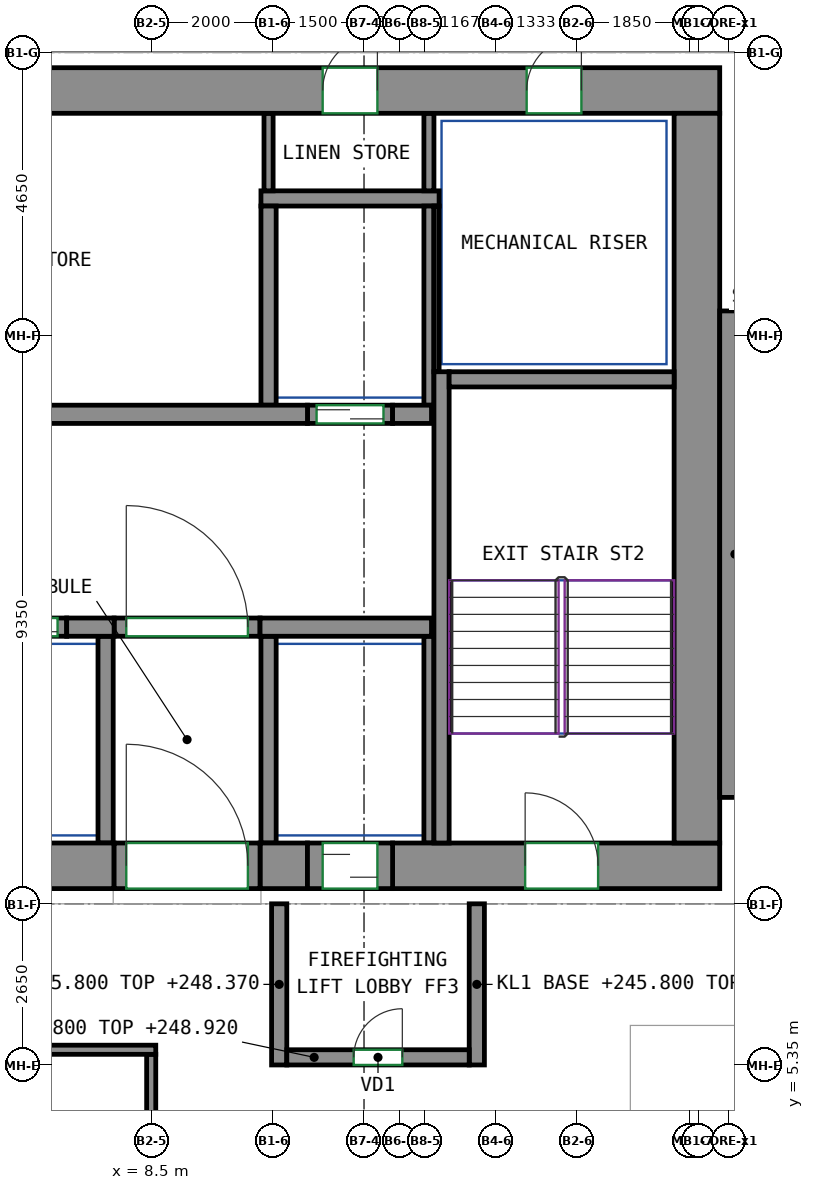
"""IFC4 building model, lengths in metres.
Left out: names, types, materials, properties, quantities, classifications, styles, units other than length and angle.
Written with IfcOpenShell. Run it as: python <this file> out.ifc"""

import sys

from ifc_helpers import new_model, si_unit, direction, frame, frame_2d, origin, place, context, subcontext, project, spatial, rectangle, extrude, source, transform, mapped, element, fill, save


model = new_model("IFC4")
c1 = context("Model", 3, precision=1e-05, world=origin(), true_north=direction((0.0, 1.0)))
c2 = subcontext(c1, "Body", "Model", "MODEL_VIEW")
j1 = project(units=[si_unit("LENGTHUNIT", "METRE"), si_unit("PLANEANGLEUNIT", "RADIAN")], contexts=[c1])
p1 = place(None, origin())
s1 = spatial("IfcSite", under=j1, at=p1, CompositionType="ELEMENT")
p2 = place(p1, origin())
s2 = spatial("IfcBuilding", under=s1, at=p2, CompositionType="ELEMENT")
p3 = place(p2, frame((0.0, 0.0, 245.8)))
s3 = spatial("IfcBuildingStorey", under=s2, at=p3, CompositionType="ELEMENT", Elevation=245.8)
m1 = source(origin(), c2, "Body", "SweptSolid", [
    extrude(rectangle(XDim=14.18, YDim=0.75, at=frame_2d((7.09, 0.0))), origin(), (0.0, 0.0, 1.0), 3.12),
])
p4 = place(p3, frame((-6.29, 8.625, 0.0), z_axis=(0.0, 0.0, 1.0), x_axis=(1.0, 0.0, 0.0)))
e1 = element("IfcWall", 1, at=p4, inside=s3, PredefinedType="SHEAR", context=c2, shape_type="MappedRepresentation", body=[
    mapped(m1, transform((0.0, 0.0, 0.0))),
])
m2 = source(origin(), c2, "Body", "SweptSolid", [
    extrude(rectangle(XDim=0.78, YDim=0.75, at=frame_2d((0.39, 0.0))), origin(), (0.0, 0.0, 1.0), 3.12),
])
p5 = place(p3, frame((10.29, 8.625, 0.0), z_axis=(0.0, 0.0, 1.0), x_axis=(1.0, 0.0, 0.0)))
e2 = element("IfcWall", 2, at=p5, inside=s3, PredefinedType="SHEAR", context=c2, shape_type="MappedRepresentation", body=[
    mapped(m2, transform((0.0, 0.0, 0.0))),
])
m3 = source(origin(), c2, "Body", "SweptSolid", [
    extrude(rectangle(XDim=5.38, YDim=0.75, at=frame_2d((2.69, 0.0))), origin(), (0.0, 0.0, 1.0), 3.12),
])
p6 = place(p3, frame((12.47, 8.625, 0.0), z_axis=(0.0, 0.0, 1.0), x_axis=(1.0, 0.0, 0.0)))
e3 = element("IfcWall", 3, at=p6, inside=s3, PredefinedType="SHEAR", context=c2, shape_type="MappedRepresentation", body=[
    mapped(m3, transform((0.0, 0.0, 0.0))),
])
p7 = place(p6, frame((2.18, 0.0, 0.0)))
e4 = element("IfcOpeningElement", 4, at=p7, cuts=e3, PredefinedType="OPENING", context=c2, shape_type="SweptSolid", body=[
    extrude(rectangle(XDim=1.2, YDim=2.1, at=frame_2d((0.6, 1.05))), frame((0.0, 0.385, 0.0), z_axis=(0.0, -1.0, 0.0), x_axis=(1.0, 0.0, 0.0)), (0.0, 0.0, 1.0), 0.77),
])
m4 = source(origin(), c2, "Body", "SweptSolid", [
    extrude(rectangle(XDim=33.6, YDim=0.75, at=frame_2d((16.8, 0.0))), origin(), (0.0, 0.0, 1.0), 3.12),
])
p8 = place(p3, frame((-15.75, 21.375, 0.0), z_axis=(0.0, 0.0, 1.0), x_axis=(1.0, 0.0, 0.0)))
e5 = element("IfcWall", 5, at=p8, inside=s3, PredefinedType="SHEAR", context=c2, shape_type="MappedRepresentation", body=[
    mapped(m4, transform((0.0, 0.0, 0.0))),
])
p9 = place(p8, frame((5.858, 0.0, 0.0)))
e6 = element("IfcOpeningElement", 6, at=p9, cuts=e5, PredefinedType="OPENING", context=c2, shape_type="SweptSolid", body=[
    extrude(rectangle(XDim=0.9, YDim=2.1, at=frame_2d((0.45, 1.05))), frame((0.0, 0.385, 0.0), z_axis=(0.0, -1.0, 0.0), x_axis=(1.0, 0.0, 0.0)), (0.0, 0.0, 1.0), 0.77),
])
p10 = place(p8, frame((10.923, 0.0, 0.0)))
e7 = element("IfcOpeningElement", 7, at=p10, cuts=e5, PredefinedType="OPENING", context=c2, shape_type="SweptSolid", body=[
    extrude(rectangle(XDim=0.9, YDim=2.1, at=frame_2d((0.45, 1.05))), frame((0.0, 0.385, 0.0), z_axis=(0.0, -1.0, 0.0), x_axis=(1.0, 0.0, 0.0)), (0.0, 0.0, 1.0), 0.77),
])
p11 = place(p8, frame((15.988, 0.0, 0.0)))
e8 = element("IfcOpeningElement", 8, at=p11, cuts=e5, PredefinedType="OPENING", context=c2, shape_type="SweptSolid", body=[
    extrude(rectangle(XDim=0.9, YDim=2.1, at=frame_2d((0.45, 1.05))), frame((0.0, 0.385, 0.0), z_axis=(0.0, -1.0, 0.0), x_axis=(1.0, 0.0, 0.0)), (0.0, 0.0, 1.0), 0.77),
])
p12 = place(p8, frame((21.643, 0.0, 0.0)))
e9 = element("IfcOpeningElement", 9, at=p12, cuts=e5, PredefinedType="OPENING", context=c2, shape_type="SweptSolid", body=[
    extrude(rectangle(XDim=0.9, YDim=2.1, at=frame_2d((0.45, 1.05))), frame((0.0, 0.385, 0.0), z_axis=(0.0, -1.0, 0.0), x_axis=(1.0, 0.0, 0.0)), (0.0, 0.0, 1.0), 0.77),
])
p13 = place(p8, frame((27.07, 0.0, 0.0)))
e10 = element("IfcOpeningElement", 10, at=p13, cuts=e5, PredefinedType="OPENING", context=c2, shape_type="SweptSolid", body=[
    extrude(rectangle(XDim=0.9, YDim=2.1, at=frame_2d((0.45, 1.05))), frame((0.0, 0.385, 0.0), z_axis=(0.0, -1.0, 0.0), x_axis=(1.0, 0.0, 0.0)), (0.0, 0.0, 1.0), 0.77),
])
p14 = place(p8, frame((2.275, 0.0, 0.0)))
e11 = element("IfcOpeningElement", 11, at=p14, cuts=e5, PredefinedType="OPENING", context=c2, shape_type="SweptSolid", body=[
    extrude(rectangle(XDim=0.9, YDim=2.1, at=frame_2d((0.45, 1.05))), frame((0.0, 0.385, 0.0), z_axis=(0.0, -1.0, 0.0), x_axis=(1.0, 0.0, 0.0)), (0.0, 0.0, 1.0), 0.77),
])
p15 = place(p8, frame((30.425, 0.0, 0.0)))
e12 = element("IfcOpeningElement", 12, at=p15, cuts=e5, PredefinedType="OPENING", context=c2, shape_type="SweptSolid", body=[
    extrude(rectangle(XDim=0.9, YDim=2.1, at=frame_2d((0.45, 1.05))), frame((0.0, 0.385, 0.0), z_axis=(0.0, -1.0, 0.0), x_axis=(1.0, 0.0, 0.0)), (0.0, 0.0, 1.0), 0.77),
])
m5 = source(origin(), c2, "Body", "SweptSolid", [
    extrude(rectangle(XDim=12.0, YDim=0.75, at=frame_2d((6.0, 0.0))), origin(), (0.0, 0.0, 1.0), 3.12),
])
p16 = place(p3, frame((17.475, 9.0, 0.0), z_axis=(0.0, 0.0, 1.0), x_axis=(0.0, 1.0, 0.0)))
e13 = element("IfcWall", 13, at=p16, inside=s3, PredefinedType="SHEAR", context=c2, shape_type="MappedRepresentation", body=[
    mapped(m5, transform((0.0, 0.0, 0.0))),
])
m6 = source(origin(), c2, "Body", "SweptSolid", [
    extrude(rectangle(XDim=7.75, YDim=0.25, at=frame_2d((3.875, 0.0))), origin(), (0.0, 0.0, 1.0), 3.12),
])
p17 = place(p3, frame((13.275, 9.0, 0.0), z_axis=(0.0, 0.0, 1.0), x_axis=(0.0, 1.0, 0.0)))
e14 = element("IfcWall", 14, at=p17, inside=s3, PredefinedType="SHEAR", context=c2, shape_type="MappedRepresentation", body=[
    mapped(m6, transform((0.0, 0.0, 0.0))),
])
m7 = source(origin(), c2, "Body", "SweptSolid", [
    extrude(rectangle(XDim=3.7, YDim=0.25, at=frame_2d((1.85, 0.0))), origin(), (0.0, 0.0, 1.0), 3.12),
])
p18 = place(p3, frame((13.4, 16.625, 0.0), z_axis=(0.0, 0.0, 1.0), x_axis=(1.0, 0.0, 0.0)))
e15 = element("IfcWall", 15, at=p18, inside=s3, PredefinedType="SHEAR", context=c2, shape_type="MappedRepresentation", body=[
    mapped(m7, transform((0.0, 0.0, 0.0))),
])
m8 = source(origin(), c2, "Body", "SweptSolid", [
    extrude(rectangle(XDim=8.0, YDim=0.5, at=frame_2d((4.0, 0.0))), origin(), (0.0, 0.0, 1.0), 3.12),
])
p19 = place(p3, frame((18.1, 9.75, 0.0), z_axis=(0.0, 0.0, 1.0), x_axis=(0.0, 1.0, 0.0)))
e16 = element("IfcWall", 16, at=p19, inside=s3, PredefinedType="SHEAR", context=c2, shape_type="MappedRepresentation", body=[
    mapped(m8, transform((0.0, 0.0, 0.0))),
])
m9 = source(origin(), c2, "Body", "SweptSolid", [
    extrude(rectangle(XDim=0.78, YDim=0.3, at=frame_2d((0.39, 0.0))), origin(), (0.0, 0.0, 1.0), 3.12),
])
p20 = place(p3, frame((7.11, 12.55, 0.0), z_axis=(0.0, 0.0, 1.0), x_axis=(1.0, 0.0, 0.0)))
e17 = element("IfcWall", 17, at=p20, inside=s3, PredefinedType="SHEAR", context=c2, shape_type="MappedRepresentation", body=[
    mapped(m9, transform((0.0, 0.0, 0.0))),
])
m10 = source(origin(), c2, "Body", "SweptSolid", [
    extrude(rectangle(XDim=2.82, YDim=0.3, at=frame_2d((1.41, 0.0))), origin(), (0.0, 0.0, 1.0), 3.12),
])
p21 = place(p3, frame((10.29, 12.55, 0.0), z_axis=(0.0, 0.0, 1.0), x_axis=(1.0, 0.0, 0.0)))
e18 = element("IfcWall", 18, at=p21, inside=s3, PredefinedType="SHEAR", context=c2, shape_type="MappedRepresentation", body=[
    mapped(m10, transform((0.0, 0.0, 0.0))),
])
m11 = source(origin(), c2, "Body", "SweptSolid", [
    extrude(rectangle(XDim=22.08, YDim=0.3, at=frame_2d((11.04, 0.0))), origin(), (0.0, 0.0, 1.0), 3.12),
])
p22 = place(p3, frame((-11.01, 16.05, 0.0), z_axis=(0.0, 0.0, 1.0), x_axis=(1.0, 0.0, 0.0)))
e19 = element("IfcWall", 19, at=p22, inside=s3, PredefinedType="SHEAR", context=c2, shape_type="MappedRepresentation", body=[
    mapped(m11, transform((0.0, 0.0, 0.0))),
])
m12 = source(origin(), c2, "Body", "SweptSolid", [
    extrude(rectangle(XDim=0.64, YDim=0.3, at=frame_2d((0.32, 0.0))), origin(), (0.0, 0.0, 1.0), 3.12),
])
p23 = place(p3, frame((12.47, 16.05, 0.0), z_axis=(0.0, 0.0, 1.0), x_axis=(1.0, 0.0, 0.0)))
e20 = element("IfcWall", 20, at=p23, inside=s3, PredefinedType="SHEAR", context=c2, shape_type="MappedRepresentation", body=[
    mapped(m12, transform((0.0, 0.0, 0.0))),
])
m13 = source(origin(), c2, "Body", "SweptSolid", [
    extrude(rectangle(XDim=1.4, YDim=0.3, at=frame_2d((0.7, 0.0))), origin(), (0.0, 0.0, 1.0), 3.12),
])
p24 = place(p3, frame((5.71, 12.55, 0.0), z_axis=(0.0, 0.0, 1.0), x_axis=(1.0, 0.0, 0.0)))
e21 = element("IfcWall", 21, at=p24, inside=s3, PredefinedType="PARTITIONING", context=c2, shape_type="MappedRepresentation", body=[
    mapped(m13, transform((0.0, 0.0, 0.0))),
])
p25 = place(p24, frame((0.15, 0.0, 0.0)))
e22 = element("IfcOpeningElement", 22, at=p25, cuts=e21, PredefinedType="OPENING", context=c2, shape_type="SweptSolid", body=[
    extrude(rectangle(XDim=1.1, YDim=2.1, at=frame_2d((0.55, 1.05))), frame((0.0, 0.16, 0.0), z_axis=(0.0, -1.0, 0.0), x_axis=(1.0, 0.0, 0.0)), (0.0, 0.0, 1.0), 0.32),
])
m14 = source(origin(), c2, "Body", "SweptSolid", [
    extrude(rectangle(XDim=1.4, YDim=0.3, at=frame_2d((0.7, 0.0))), origin(), (0.0, 0.0, 1.0), 3.12),
])
p26 = place(p3, frame((11.07, 16.05, 0.0), z_axis=(0.0, 0.0, 1.0), x_axis=(1.0, 0.0, 0.0)))
e23 = element("IfcWall", 23, at=p26, inside=s3, PredefinedType="PARTITIONING", context=c2, shape_type="MappedRepresentation", body=[
    mapped(m14, transform((0.0, 0.0, 0.0))),
])
p27 = place(p26, frame((0.15, 0.0, 0.0)))
e24 = element("IfcOpeningElement", 24, at=p27, cuts=e23, PredefinedType="OPENING", context=c2, shape_type="SweptSolid", body=[
    extrude(rectangle(XDim=1.1, YDim=2.1, at=frame_2d((0.55, 1.05))), frame((0.0, 0.16, 0.0), z_axis=(0.0, -1.0, 0.0), x_axis=(1.0, 0.0, 0.0)), (0.0, 0.0, 1.0), 0.32),
])
m15 = source(origin(), c2, "Body", "SweptSolid", [
    extrude(rectangle(XDim=2.4, YDim=0.3, at=frame_2d((1.2, 0.0))), origin(), (0.0, 0.0, 1.0), 3.12),
])
p28 = place(p3, frame((7.89, 12.55, 0.0), z_axis=(0.0, 0.0, 1.0), x_axis=(1.0, 0.0, 0.0)))
e25 = element("IfcWall", 25, at=p28, inside=s3, PredefinedType="PARTITIONING", context=c2, shape_type="MappedRepresentation", body=[
    mapped(m15, transform((0.0, 0.0, 0.0))),
])
p29 = place(p28, frame((0.2, 0.0, 0.0)))
e26 = element("IfcOpeningElement", 26, at=p29, cuts=e25, PredefinedType="OPENING", context=c2, shape_type="SweptSolid", body=[
    extrude(rectangle(XDim=2.0, YDim=2.1, at=frame_2d((1.0, 1.05))), frame((0.0, 0.16, 0.0), z_axis=(0.0, -1.0, 0.0), x_axis=(1.0, 0.0, 0.0)), (0.0, 0.0, 1.0), 0.32),
])
m16 = source(origin(), c2, "Body", "SweptSolid", [
    extrude(rectangle(XDim=2.65, YDim=0.25, at=frame_2d((1.325, 0.0))), origin(), (0.0, 0.0, 1.0), 2.57),
])
for number, where, z_axis, x_axis in (
    (27, (10.605, 5.35, 0.0), (0.0, 0.0, 1.0), (0.0, 1.0, 0.0)),
    (28, (13.855, 5.35, 0.0), (0.0, 0.0, 1.0), (0.0, 1.0, 0.0)),
):
    element("IfcWall", number, at=place(p3, frame(where, z_axis=z_axis, x_axis=x_axis)), inside=s3, PredefinedType="PARTITIONING", context=c2, shape_type="MappedRepresentation", body=[
        mapped(m16, transform((0.0, 0.0, 0.0))),
    ])
m17 = source(origin(), c2, "Body", "SweptSolid", [
    extrude(rectangle(XDim=3.0, YDim=0.25, at=frame_2d((1.5, 0.0))), origin(), (0.0, 0.0, 1.0), 3.12),
])
p30 = place(p3, frame((10.73, 5.475, 0.0), z_axis=(0.0, 0.0, 1.0), x_axis=(1.0, 0.0, 0.0)))
e29 = element("IfcWall", 29, at=p30, inside=s3, PredefinedType="PARTITIONING", context=c2, shape_type="MappedRepresentation", body=[
    mapped(m17, transform((0.0, 0.0, 0.0))),
])
p31 = place(p30, frame((1.1, 0.0, 0.0)))
e30 = element("IfcOpeningElement", 30, at=p31, cuts=e29, PredefinedType="OPENING", context=c2, shape_type="SweptSolid", body=[
    extrude(rectangle(XDim=0.8, YDim=2.0, at=frame_2d((0.4, 1.0))), frame((0.0, 0.135, 0.0), z_axis=(0.0, -1.0, 0.0), x_axis=(1.0, 0.0, 0.0)), (0.0, 0.0, 1.0), 0.27),
])
m18 = source(origin(), c2, "Body", "SweptSolid", [
    extrude(rectangle(XDim=2.93, YDim=0.25, at=frame_2d((1.465, 0.0))), origin(), (0.0, 0.0, 1.0), 3.12),
])
p32 = place(p3, frame((10.305, 19.6, 0.0), z_axis=(0.0, 0.0, 1.0), x_axis=(1.0, 0.0, 0.0)))
e31 = element("IfcWall", 31, at=p32, inside=s3, PredefinedType="PARTITIONING", context=c2, shape_type="MappedRepresentation", body=[
    mapped(m18, transform((0.0, 0.0, 0.0))),
])
m19 = source(origin(), c2, "Body", "SweptSolid", [
    extrude(rectangle(XDim=3.275, YDim=0.165, at=frame_2d((1.638, 0.0))), origin(), (0.0, 0.0, 1.0), 3.12),
])
p33 = place(p3, frame((13.067, 16.2, 0.0), z_axis=(0.0, 0.0, 1.0), x_axis=(0.0, 1.0, 0.0)))
e32 = element("IfcWall", 32, at=p33, inside=s3, PredefinedType="PARTITIONING", context=c2, shape_type="MappedRepresentation", body=[
    mapped(m19, transform((0.0, 0.0, 0.0))),
])
m20 = source(origin(), c2, "Body", "SweptSolid", [
    extrude(rectangle(XDim=1.275, YDim=0.165, at=frame_2d((0.637, 0.0))), origin(), (0.0, 0.0, 1.0), 3.12),
])
p34 = place(p3, frame((13.067, 19.725, 0.0), z_axis=(0.0, 0.0, 1.0), x_axis=(0.0, 1.0, 0.0)))
e33 = element("IfcWall", 33, at=p34, inside=s3, PredefinedType="PARTITIONING", context=c2, shape_type="MappedRepresentation", body=[
    mapped(m20, transform((0.0, 0.0, 0.0))),
])
m21 = source(origin(), c2, "Body", "SweptSolid", [
    extrude(rectangle(XDim=3.275, YDim=0.25, at=frame_2d((1.638, 0.0))), origin(), (0.0, 0.0, 1.0), 3.12),
])
p35 = place(p3, frame((10.43, 16.2, 0.0), z_axis=(0.0, 0.0, 1.0), x_axis=(0.0, 1.0, 0.0)))
e34 = element("IfcWall", 34, at=p35, inside=s3, PredefinedType="PARTITIONING", context=c2, shape_type="MappedRepresentation", body=[
    mapped(m21, transform((0.0, 0.0, 0.0))),
])
m22 = source(origin(), c2, "Body", "SweptSolid", [
    extrude(rectangle(XDim=2.725, YDim=0.085, at=frame_2d((1.363, 0.0))), origin(), (0.0, 0.0, 1.0), 3.12),
])
p36 = place(p3, frame((13.192, 16.75, 0.0), z_axis=(0.0, 0.0, 1.0), x_axis=(0.0, 1.0, 0.0)))
e35 = element("IfcWall", 35, at=p36, inside=s3, PredefinedType="PARTITIONING", context=c2, shape_type="MappedRepresentation", body=[
    mapped(m22, transform((0.0, 0.0, 0.0))),
])
m23 = source(origin(), c2, "Body", "SweptSolid", [
    extrude(rectangle(XDim=3.4, YDim=0.25, at=frame_2d((1.7, 0.0))), origin(), (0.0, 0.0, 1.0), 3.12),
])
p37 = place(p3, frame((10.43, 9.0, 0.0), z_axis=(0.0, 0.0, 1.0), x_axis=(0.0, 1.0, 0.0)))
e36 = element("IfcWall", 36, at=p37, inside=s3, PredefinedType="PARTITIONING", context=c2, shape_type="MappedRepresentation", body=[
    mapped(m23, transform((0.0, 0.0, 0.0))),
])
m24 = source(origin(), c2, "Body", "SweptSolid", [
    extrude(rectangle(XDim=3.4, YDim=0.165, at=frame_2d((1.7, 0.0))), origin(), (0.0, 0.0, 1.0), 3.12),
])
p38 = place(p3, frame((13.067, 9.0, 0.0), z_axis=(0.0, 0.0, 1.0), x_axis=(0.0, 1.0, 0.0)))
e37 = element("IfcWall", 37, at=p38, inside=s3, PredefinedType="PARTITIONING", context=c2, shape_type="MappedRepresentation", body=[
    mapped(m24, transform((0.0, 0.0, 0.0))),
])
p39 = place(p3, frame((7.75, 9.0, 0.0), z_axis=(0.0, 0.0, 1.0), x_axis=(0.0, 1.0, 0.0)))
e38 = element("IfcWall", 38, at=p39, inside=s3, PredefinedType="PARTITIONING", context=c2, shape_type="MappedRepresentation", body=[
    mapped(m23, transform((0.0, 0.0, 0.0))),
])
m25 = source(origin(), c2, "Body", "SweptSolid", [
    extrude(rectangle(XDim=1.275, YDim=0.15, at=frame_2d((0.637, 0.0))), origin(), (0.0, 0.0, 1.0), 3.12),
])
p40 = place(p3, frame((10.43, 19.725, 0.0), z_axis=(0.0, 0.0, 1.0), x_axis=(0.0, 1.0, 0.0)))
e39 = element("IfcWall", 39, at=p40, inside=s3, PredefinedType="PARTITIONING", context=c2, shape_type="MappedRepresentation", body=[
    mapped(m25, transform((0.0, 0.0, 0.0))),
])
m26 = source(origin(), c2, "Body", "SweptSolid", [
    extrude(rectangle(XDim=2.4, YDim=0.75, at=frame_2d((1.2, 0.0))), origin(), (0.0, 0.0, 1.0), 2.7),
])
p41 = place(p3, frame((7.89, 8.625, 0.0), z_axis=(0.0, 0.0, 1.0), x_axis=(1.0, 0.0, 0.0)))
e40 = element("IfcWall", 40, at=p41, inside=s3, PredefinedType="PARTITIONING", context=c2, shape_type="MappedRepresentation", body=[
    mapped(m26, transform((0.0, 0.0, 0.0))),
])
p42 = place(p41, frame((0.2, 0.0, 0.0)))
e41 = element("IfcOpeningElement", 41, at=p42, cuts=e40, PredefinedType="OPENING", context=c2, shape_type="SweptSolid", body=[
    extrude(rectangle(XDim=2.0, YDim=2.1, at=frame_2d((1.0, 1.05))), frame((0.0, 0.385, 0.0), z_axis=(0.0, -1.0, 0.0), x_axis=(1.0, 0.0, 0.0)), (0.0, 0.0, 1.0), 0.77),
])
m27 = source(origin(), c2, "Body", "SweptSolid", [
    extrude(rectangle(XDim=1.4, YDim=0.75, at=frame_2d((0.7, 0.0))), origin(), (0.0, 0.0, 1.0), 2.7),
])
p43 = place(p3, frame((11.07, 8.625, 0.0), z_axis=(0.0, 0.0, 1.0), x_axis=(1.0, 0.0, 0.0)))
e42 = element("IfcWall", 42, at=p43, inside=s3, PredefinedType="PARTITIONING", context=c2, shape_type="MappedRepresentation", body=[
    mapped(m27, transform((0.0, 0.0, 0.0))),
])
p44 = place(p43, frame((0.25, 0.0, 0.0)))
e43 = element("IfcOpeningElement", 43, at=p44, cuts=e42, PredefinedType="OPENING", context=c2, shape_type="SweptSolid", body=[
    extrude(rectangle(XDim=0.9, YDim=2.1, at=frame_2d((0.45, 1.05))), frame((0.0, 0.385, 0.0), z_axis=(0.0, -1.0, 0.0), x_axis=(1.0, 0.0, 0.0)), (0.0, 0.0, 1.0), 0.77),
])
p45 = place(p3, frame((8.5, 5.525, 0.0), z_axis=(0.0, 0.0, 1.0), x_axis=(0.0, -1.0, 0.0)))
e44 = element("IfcWall", 44, at=p45, inside=s3, PredefinedType="PARTITIONING", context=c2, shape_type="SweptSolid", body=[
    extrude(rectangle(XDim=14.85, YDim=0.15, at=frame_2d((7.425, 0.0))), origin(), (0.0, 0.0, 1.0), 3.12),
])
p46 = place(p3, frame((-5.4, 5.6, 0.0), z_axis=(0.0, 0.0, 1.0), x_axis=(1.0, 0.0, 0.0)))
e45 = element("IfcWall", 45, at=p46, inside=s3, PredefinedType="PARTITIONING", context=c2, shape_type="SweptSolid", body=[
    extrude(rectangle(XDim=13.975, YDim=0.15, at=frame_2d((6.987, 0.0))), origin(), (0.0, 0.0, 1.0), 3.12),
])
p47 = place(p29, origin())
e46 = element("IfcDoor", 46, at=p47, inside=s3, OperationType="DOUBLE_DOOR_SINGLE_SWING", PredefinedType="DOOR", context=c2, shape_type="SweptSolid", body=[
    extrude(rectangle(XDim=2.0, YDim=2.1, at=frame_2d((1.0, 1.05))), frame((0.0, 0.025, 0.0), z_axis=(0.0, -1.0, 0.0), x_axis=(1.0, 0.0, 0.0)), (0.0, 0.0, 1.0), 0.05),
])
fill(e26, e46)
p48 = place(p42, origin())
e47 = element("IfcDoor", 47, at=p48, inside=s3, OperationType="DOUBLE_DOOR_SINGLE_SWING", PredefinedType="DOOR", context=c2, shape_type="SweptSolid", body=[
    extrude(rectangle(XDim=2.0, YDim=2.1, at=frame_2d((1.0, 1.05))), frame((0.0, 0.28, 0.0), z_axis=(0.0, -1.0, 0.0), x_axis=(1.0, 0.0, 0.0)), (0.0, 0.0, 1.0), 0.05),
])
fill(e41, e47)
p49 = place(p31, origin())
e48 = element("IfcDoor", 48, at=p49, inside=s3, OperationType="SINGLE_SWING_RIGHT", PredefinedType="DOOR", context=c2, shape_type="SweptSolid", body=[
    extrude(rectangle(XDim=0.8, YDim=2.0, at=frame_2d((0.4, 1.0))), frame((0.0, 0.025, 0.0), z_axis=(0.0, -1.0, 0.0), x_axis=(1.0, 0.0, 0.0)), (0.0, 0.0, 1.0), 0.05),
])
fill(e30, e48)
p50 = place(p44, origin())
e49 = element("IfcDoor", 49, at=p50, inside=s3, OperationType="SLIDING_TO_LEFT", PredefinedType="DOOR", context=c2, shape_type="SweptSolid", body=[
    extrude(rectangle(XDim=0.9, YDim=2.1, at=frame_2d((0.45, 1.05))), frame((0.0, 0.28, 0.0), z_axis=(0.0, -1.0, 0.0), x_axis=(1.0, 0.0, 0.0)), (0.0, 0.0, 1.0), 0.05),
])
fill(e43, e49)
p51 = place(p25, origin())
e50 = element("IfcDoor", 50, at=p51, inside=s3, OperationType="DOUBLE_DOOR_SLIDING", PredefinedType="DOOR", context=c2, shape_type="SweptSolid", body=[
    extrude(rectangle(XDim=1.1, YDim=2.1, at=frame_2d((0.55, 1.05))), frame((0.0, 0.025, 0.0), z_axis=(0.0, -1.0, 0.0), x_axis=(1.0, 0.0, 0.0)), (0.0, 0.0, 1.0), 0.05),
])
fill(e22, e50)
p52 = place(p27, origin())
e51 = element("IfcDoor", 51, at=p52, inside=s3, OperationType="DOUBLE_DOOR_SLIDING", PredefinedType="DOOR", context=c2, shape_type="SweptSolid", body=[
    extrude(rectangle(XDim=1.1, YDim=2.1, at=frame_2d((0.55, 1.05))), frame((0.0, 0.025, 0.0), z_axis=(0.0, -1.0, 0.0), x_axis=(1.0, 0.0, 0.0)), (0.0, 0.0, 1.0), 0.05),
])
fill(e24, e51)
p53 = place(p13, origin())
e52 = element("IfcDoor", 52, at=p53, inside=s3, OperationType="SINGLE_SWING_RIGHT", PredefinedType="DOOR", context=c2, shape_type="SweptSolid", body=[
    extrude(rectangle(XDim=0.9, YDim=2.1, at=frame_2d((0.45, 1.05))), frame((0.0, -0.23, 0.0), z_axis=(0.0, -1.0, 0.0), x_axis=(1.0, 0.0, 0.0)), (0.0, 0.0, 1.0), 0.05),
])
fill(e10, e52)
p54 = place(p15, origin())
e53 = element("IfcDoor", 53, at=p54, inside=s3, OperationType="SINGLE_SWING_RIGHT", PredefinedType="DOOR", context=c2, shape_type="SweptSolid", body=[
    extrude(rectangle(XDim=0.9, YDim=2.1, at=frame_2d((0.45, 1.05))), frame((0.0, -0.23, 0.0), z_axis=(0.0, -1.0, 0.0), x_axis=(1.0, 0.0, 0.0)), (0.0, 0.0, 1.0), 0.05),
])
fill(e12, e53)
p55 = place(p7, origin())
e54 = element("IfcDoor", 54, at=p55, inside=s3, OperationType="DOUBLE_DOOR_SINGLE_SWING", PredefinedType="DOOR", context=c2, shape_type="SweptSolid", body=[
    extrude(rectangle(XDim=1.2, YDim=2.1, at=frame_2d((0.6, 1.05))), frame((0.0, 0.28, 0.0), z_axis=(0.0, -1.0, 0.0), x_axis=(1.0, 0.0, 0.0)), (0.0, 0.0, 1.0), 0.05),
])
fill(e4, e54)
save(model, sys.argv[1])
